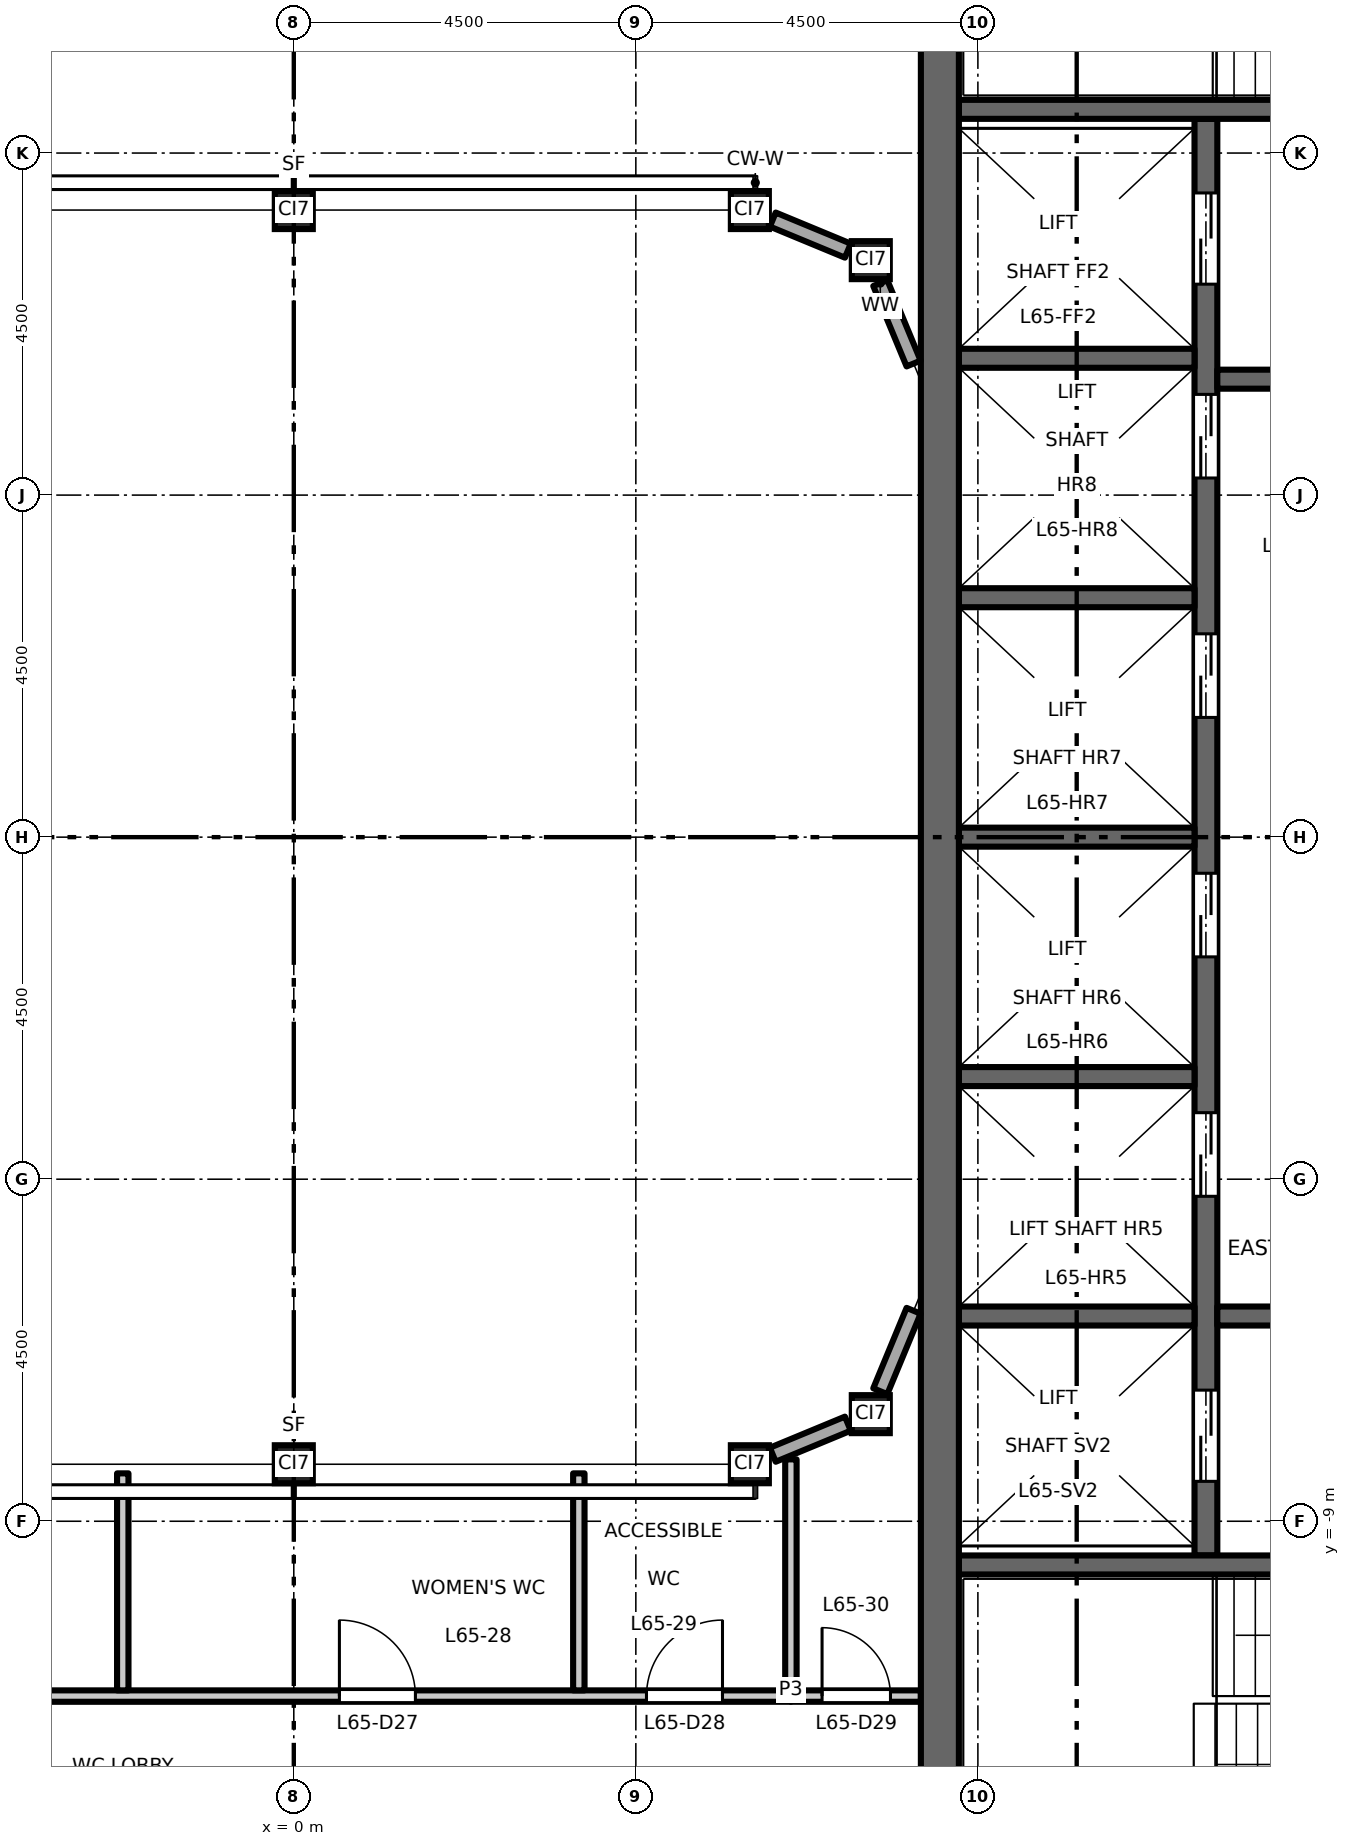
"""IFC4 building model, lengths in metres.
Left out: names, types, materials, properties, quantities, classifications, styles, units other than length and angle.
Written with IfcOpenShell. Run it as: python <this file> out.ifc"""

import sys

from ifc_helpers import new_model, si_unit, direction, frame, frame_2d, origin, origin_2d, place, context, subcontext, project, spatial, rectangle, hollow_rectangle, extrude, element, fill, save


model = new_model("IFC4")
c1 = context("Model", 3, precision=1e-05, world=origin(), true_north=direction((0.0, 1.0)))
c2 = subcontext(c1, "Body", "Model", "MODEL_VIEW")
j1 = project(units=[si_unit("LENGTHUNIT", "METRE"), si_unit("PLANEANGLEUNIT", "RADIAN")], contexts=[c1])
p1 = place(None, origin())
s1 = spatial("IfcSite", under=j1, at=p1, CompositionType="ELEMENT")
p2 = place(p1, origin())
s2 = spatial("IfcBuilding", under=s1, at=p2, CompositionType="ELEMENT")
p3 = place(p2, frame((0.0, 0.0, 303.2)))
s3 = spatial("IfcBuildingStorey", under=s2, at=p3, CompositionType="ELEMENT", Elevation=303.2)
for number, where, z_axis, x_axis in (
    (1, (0.0, -8.25, 0.0), (0.0, 0.0, 1.0), (1.0, 0.0, 0.0)),
    (2, (6.0, -8.25, 0.0), (0.0, 0.0, 1.0), (1.0, 0.0, 0.0)),
    (3, (7.591, -7.591, 0.0), (0.0, 0.0, 1.0), (1.0, 0.0, 0.0)),
    (4, (0.0, 8.25, 0.0), (0.0, 0.0, 1.0), (1.0, 0.0, 0.0)),
    (5, (6.0, 8.25, 0.0), (0.0, 0.0, 1.0), (1.0, 0.0, 0.0)),
    (6, (7.591, 7.591, 0.0), (0.0, 0.0, 1.0), (1.0, 0.0, 0.0)),
):
    element("IfcColumn", number, at=place(p3, frame(where, z_axis=z_axis, x_axis=x_axis)), inside=s3, PredefinedType="COLUMN", context=c2, shape_type="SweptSolid", body=[
        extrude(hollow_rectangle(XDim=0.5, YDim=0.5, WallThickness=0.025, at=origin_2d()), origin(), (0.0, 0.0, 1.0), 4.5),
    ])
p4 = place(p3, frame((12.0, -9.45, 0.0), z_axis=(0.0, 0.0, 1.0), x_axis=(0.0, 1.0, 0.0)))
e7 = element("IfcWall", 7, at=p4, inside=s3, PredefinedType="SHEAR", context=c2, shape_type="SweptSolid", body=[
    extrude(rectangle(XDim=18.9, YDim=0.3, at=frame_2d((9.45, 0.0))), origin(), (0.0, 0.0, 1.0), 4.35),
])
p5 = place(p4, frame((4.725, 0.0, 0.0)))
e8 = element("IfcOpeningElement", 8, at=p5, cuts=e7, PredefinedType="OPENING", context=c2, shape_type="SweptSolid", body=[
    extrude(rectangle(XDim=1.1, YDim=2.1, at=frame_2d((0.55, 1.05))), frame((0.0, 0.16, 0.0), z_axis=(0.0, -1.0, 0.0), x_axis=(1.0, 0.0, 0.0)), (0.0, 0.0, 1.0), 0.32),
])
p6 = place(p4, frame((7.875, 0.0, 0.0)))
e9 = element("IfcOpeningElement", 9, at=p6, cuts=e7, PredefinedType="OPENING", context=c2, shape_type="SweptSolid", body=[
    extrude(rectangle(XDim=1.1, YDim=2.1, at=frame_2d((0.55, 1.05))), frame((0.0, 0.16, 0.0), z_axis=(0.0, -1.0, 0.0), x_axis=(1.0, 0.0, 0.0)), (0.0, 0.0, 1.0), 0.32),
])
p7 = place(p4, frame((11.025, 0.0, 0.0)))
e10 = element("IfcOpeningElement", 10, at=p7, cuts=e7, PredefinedType="OPENING", context=c2, shape_type="SweptSolid", body=[
    extrude(rectangle(XDim=1.1, YDim=2.1, at=frame_2d((0.55, 1.05))), frame((0.0, 0.16, 0.0), z_axis=(0.0, -1.0, 0.0), x_axis=(1.0, 0.0, 0.0)), (0.0, 0.0, 1.0), 0.32),
])
p8 = place(p4, frame((14.175, 0.0, 0.0)))
e11 = element("IfcOpeningElement", 11, at=p8, cuts=e7, PredefinedType="OPENING", context=c2, shape_type="SweptSolid", body=[
    extrude(rectangle(XDim=1.1, YDim=2.1, at=frame_2d((0.55, 1.05))), frame((0.0, 0.16, 0.0), z_axis=(0.0, -1.0, 0.0), x_axis=(1.0, 0.0, 0.0)), (0.0, 0.0, 1.0), 0.32),
])
p9 = place(p4, frame((16.725, 0.0, 0.0)))
e12 = element("IfcOpeningElement", 12, at=p9, cuts=e7, PredefinedType="OPENING", context=c2, shape_type="SweptSolid", body=[
    extrude(rectangle(XDim=1.2, YDim=2.1, at=frame_2d((0.6, 1.05))), frame((0.0, 0.16, 0.0), z_axis=(0.0, -1.0, 0.0), x_axis=(1.0, 0.0, 0.0)), (0.0, 0.0, 1.0), 0.32),
])
p10 = place(p4, frame((0.975, 0.0, 0.0)))
e13 = element("IfcOpeningElement", 13, at=p10, cuts=e7, PredefinedType="OPENING", context=c2, shape_type="SweptSolid", body=[
    extrude(rectangle(XDim=1.2, YDim=2.1, at=frame_2d((0.6, 1.05))), frame((0.0, 0.16, 0.0), z_axis=(0.0, -1.0, 0.0), x_axis=(1.0, 0.0, 0.0)), (0.0, 0.0, 1.0), 0.32),
])
p11 = place(p3, frame((12.15, 6.025, 0.0), z_axis=(0.0, 0.0, 1.0), x_axis=(1.0, 0.0, 0.0)))
e14 = element("IfcWall", 14, at=p11, inside=s3, PredefinedType="SHEAR", context=c2, shape_type="SweptSolid", body=[
    extrude(rectangle(XDim=4.6, YDim=0.25, at=frame_2d((2.3, 0.0))), origin(), (0.0, 0.0, 1.0), 4.35),
])
p12 = place(p11, frame((1.8, 0.0, 0.0)))
e15 = element("IfcOpeningElement", 15, at=p12, cuts=e14, PredefinedType="OPENING", context=c2, shape_type="SweptSolid", body=[
    extrude(rectangle(XDim=1.0, YDim=2.1, at=frame_2d((0.5, 1.05))), frame((0.0, 0.135, 0.0), z_axis=(0.0, -1.0, 0.0), x_axis=(1.0, 0.0, 0.0)), (0.0, 0.0, 1.0), 0.27),
])
p13 = place(p3, frame((12.15, -6.3, 0.0), z_axis=(0.0, 0.0, 1.0), x_axis=(1.0, 0.0, 0.0)))
e16 = element("IfcWall", 16, at=p13, inside=s3, PredefinedType="SHEAR", context=c2, shape_type="SweptSolid", body=[
    extrude(rectangle(XDim=4.6, YDim=0.25, at=frame_2d((2.3, 0.0))), origin(), (0.0, 0.0, 1.0), 4.35),
])
p14 = place(p13, frame((1.8, 0.0, 0.0)))
e17 = element("IfcOpeningElement", 17, at=p14, cuts=e16, PredefinedType="OPENING", context=c2, shape_type="SweptSolid", body=[
    extrude(rectangle(XDim=1.0, YDim=2.1, at=frame_2d((0.5, 1.05))), frame((0.0, 0.135, 0.0), z_axis=(0.0, -1.0, 0.0), x_axis=(1.0, 0.0, 0.0)), (0.0, 0.0, 1.0), 0.27),
])
for number, where, z_axis, x_axis in (
    (18, (8.75, 0.0, 0.0), (0.0, 0.0, 1.0), (1.0, 0.0, 0.0)),
    (19, (8.75, 3.15, 0.0), (0.0, 0.0, 1.0), (1.0, 0.0, 0.0)),
    (20, (8.75, 6.3, 0.0), (0.0, 0.0, 1.0), (1.0, 0.0, 0.0)),
    (21, (8.75, -3.15, 0.0), (0.0, 0.0, 1.0), (1.0, 0.0, 0.0)),
    (22, (8.75, -6.3, 0.0), (0.0, 0.0, 1.0), (1.0, 0.0, 0.0)),
):
    element("IfcWall", number, at=place(p3, frame(where, z_axis=z_axis, x_axis=x_axis)), inside=s3, PredefinedType="SHEAR", context=c2, shape_type="SweptSolid", body=[
        extrude(rectangle(XDim=3.1, YDim=0.25, at=frame_2d((1.55, 0.0))), origin(), (0.0, 0.0, 1.0), 4.35),
    ])
p15 = place(p3, frame((8.75, 9.575, 0.0), z_axis=(0.0, 0.0, 1.0), x_axis=(1.0, 0.0, 0.0)))
e23 = element("IfcWall", 23, at=p15, inside=s3, PredefinedType="SHEAR", context=c2, shape_type="SweptSolid", body=[
    extrude(rectangle(XDim=8.0, YDim=0.25, at=frame_2d((4.0, 0.0))), origin(), (0.0, 0.0, 1.0), 4.35),
])
p16 = place(p15, frame((6.65, 0.0, 0.0)))
e24 = element("IfcOpeningElement", 24, at=p16, cuts=e23, PredefinedType="OPENING", context=c2, shape_type="SweptSolid", body=[
    extrude(rectangle(XDim=1.1, YDim=2.1, at=frame_2d((0.55, 1.05))), frame((0.0, 0.135, 0.0), z_axis=(0.0, -1.0, 0.0), x_axis=(1.0, 0.0, 0.0)), (0.0, 0.0, 1.0), 0.27),
])
p17 = place(p3, frame((8.75, -9.575, 0.0), z_axis=(0.0, 0.0, 1.0), x_axis=(1.0, 0.0, 0.0)))
e25 = element("IfcWall", 25, at=p17, inside=s3, PredefinedType="SHEAR", context=c2, shape_type="SweptSolid", body=[
    extrude(rectangle(XDim=8.0, YDim=0.25, at=frame_2d((4.0, 0.0))), origin(), (0.0, 0.0, 1.0), 4.35),
])
p18 = place(p17, frame((6.65, 0.0, 0.0)))
e26 = element("IfcOpeningElement", 26, at=p18, cuts=e25, PredefinedType="OPENING", context=c2, shape_type="SweptSolid", body=[
    extrude(rectangle(XDim=1.1, YDim=2.1, at=frame_2d((0.55, 1.05))), frame((0.0, 0.135, 0.0), z_axis=(0.0, -1.0, 0.0), x_axis=(1.0, 0.0, 0.0)), (0.0, 0.0, 1.0), 0.27),
])
p19 = place(p3, frame((8.5, -13.0, 0.0), z_axis=(0.0, 0.0, 1.0), x_axis=(0.0, 1.0, 0.0)))
e27 = element("IfcWall", 27, at=p19, inside=s3, PredefinedType="SHEAR", context=c2, shape_type="SweptSolid", body=[
    extrude(rectangle(XDim=26.0, YDim=0.5, at=frame_2d((13.0, 0.0))), origin(), (0.0, 0.0, 1.0), 4.35),
])
p20 = place(p3, frame((6.302, -8.125, 0.0), z_axis=(0.0, 0.0, 1.0), x_axis=(0.923919409248, 0.382587147216, 0.0)))
e28 = element("IfcWall", 28, at=p20, inside=s3, PredefinedType="STANDARD", context=c2, shape_type="SweptSolid", body=[
    extrude(rectangle(XDim=1.069, YDim=0.2, at=frame_2d((0.534, 0.0))), origin(), (0.0, 0.0, 1.0), 4.01),
])
for number, where, z_axis, x_axis in (
    (29, (7.716, -7.289, 0.0), (0.0, 0.0, 1.0), (0.383, 0.924, 0.0)),
    (30, (8.154, 6.231, 0.0), (0.0, 0.0, 1.0), (-0.383, 0.924, 0.0)),
):
    element("IfcWall", number, at=place(p3, frame(where, z_axis=z_axis, x_axis=x_axis)), inside=s3, PredefinedType="STANDARD", context=c2, shape_type="SweptSolid", body=[
        extrude(rectangle(XDim=1.146, YDim=0.2, at=frame_2d((0.573, 0.0))), origin(), (0.0, 0.0, 1.0), 4.01),
    ])
p21 = place(p3, frame((7.289, 7.716, 0.0), z_axis=(0.0, 0.0, 1.0), x_axis=(-0.923919409248, 0.382587147216, 0.0)))
e31 = element("IfcWall", 31, at=p21, inside=s3, PredefinedType="STANDARD", context=c2, shape_type="SweptSolid", body=[
    extrude(rectangle(XDim=1.069, YDim=0.2, at=frame_2d((0.534, 0.0))), origin(), (0.0, 0.0, 1.0), 4.01),
])
p22 = place(p3, frame((-8.25, -11.3, 0.0), z_axis=(0.0, 0.0, 1.0), x_axis=(1.0, 0.0, 0.0)))
e32 = element("IfcWall", 32, at=p22, inside=s3, PredefinedType="PARTITIONING", context=c2, shape_type="SweptSolid", body=[
    extrude(rectangle(XDim=14.79, YDim=0.15, at=frame_2d((7.395, 0.0))), origin(), (0.0, 0.0, 1.0), 4.35),
])
p23 = place(p22, frame((2.6, 0.0, 0.0)))
e33 = element("IfcOpeningElement", 33, at=p23, cuts=e32, PredefinedType="OPENING", context=c2, shape_type="SweptSolid", body=[
    extrude(rectangle(XDim=1.0, YDim=2.1, at=frame_2d((0.5, 1.05))), frame((0.0, 0.085, 0.0), z_axis=(0.0, -1.0, 0.0), x_axis=(1.0, 0.0, 0.0)), (0.0, 0.0, 1.0), 0.17),
])
p24 = place(p22, frame((8.85, 0.0, 0.0)))
e34 = element("IfcOpeningElement", 34, at=p24, cuts=e32, PredefinedType="OPENING", context=c2, shape_type="SweptSolid", body=[
    extrude(rectangle(XDim=1.0, YDim=2.1, at=frame_2d((0.5, 1.05))), frame((0.0, 0.085, 0.0), z_axis=(0.0, -1.0, 0.0), x_axis=(1.0, 0.0, 0.0)), (0.0, 0.0, 1.0), 0.17),
])
p25 = place(p22, frame((12.89, 0.0, 0.0)))
e35 = element("IfcOpeningElement", 35, at=p25, cuts=e32, PredefinedType="OPENING", context=c2, shape_type="SweptSolid", body=[
    extrude(rectangle(XDim=1.0, YDim=2.1, at=frame_2d((0.5, 1.05))), frame((0.0, 0.085, 0.0), z_axis=(0.0, -1.0, 0.0), x_axis=(1.0, 0.0, 0.0)), (0.0, 0.0, 1.0), 0.17),
])
p26 = place(p3, frame((6.54, -11.3, 0.0), z_axis=(0.0, 0.0, 1.0), x_axis=(1.0, 0.0, 0.0)))
e36 = element("IfcWall", 36, at=p26, inside=s3, PredefinedType="PARTITIONING", context=c2, shape_type="SweptSolid", body=[
    extrude(rectangle(XDim=1.71, YDim=0.15, at=frame_2d((0.855, 0.0))), origin(), (0.0, 0.0, 1.0), 4.35),
])
p27 = place(p26, frame((0.41, 0.0, 0.0)))
e37 = element("IfcOpeningElement", 37, at=p27, cuts=e36, PredefinedType="OPENING", context=c2, shape_type="SweptSolid", body=[
    extrude(rectangle(XDim=0.9, YDim=2.1, at=frame_2d((0.45, 1.05))), frame((0.0, 0.085, 0.0), z_axis=(0.0, -1.0, 0.0), x_axis=(1.0, 0.0, 0.0)), (0.0, 0.0, 1.0), 0.17),
])
for number, where, z_axis, x_axis in (
    (38, (-2.25, -11.225, 0.0), (0.0, 0.0, 1.0), (0.0, 1.0, 0.0)),
    (39, (3.75, -11.225, 0.0), (0.0, 0.0, 1.0), (0.0, 1.0, 0.0)),
):
    element("IfcWall", number, at=place(p3, frame(where, z_axis=z_axis, x_axis=x_axis)), inside=s3, PredefinedType="PARTITIONING", context=c2, shape_type="SweptSolid", body=[
        extrude(rectangle(XDim=2.855, YDim=0.15, at=frame_2d((1.427, 0.0))), origin(), (0.0, 0.0, 1.0), 4.35),
    ])
p28 = place(p3, frame((6.54, -11.225, 0.0), z_axis=(0.0, 0.0, 1.0), x_axis=(0.0, 1.0, 0.0)))
e40 = element("IfcWall", 40, at=p28, inside=s3, PredefinedType="PARTITIONING", context=c2, shape_type="SweptSolid", body=[
    extrude(rectangle(XDim=3.039, YDim=0.15, at=frame_2d((1.52, 0.0))), origin(), (0.0, 0.0, 1.0), 4.35),
])
p29 = place(p5, origin())
e41 = element("IfcDoor", 41, at=p29, inside=s3, OperationType="DOUBLE_DOOR_SLIDING", PredefinedType="DOOR", context=c2, shape_type="SweptSolid", body=[
    extrude(rectangle(XDim=1.1, YDim=2.1, at=frame_2d((0.55, 1.05))), frame((0.0, 0.025, 0.0), z_axis=(0.0, -1.0, 0.0), x_axis=(1.0, 0.0, 0.0)), (0.0, 0.0, 1.0), 0.05),
])
fill(e8, e41)
p30 = place(p6, origin())
e42 = element("IfcDoor", 42, at=p30, inside=s3, OperationType="DOUBLE_DOOR_SLIDING", PredefinedType="DOOR", context=c2, shape_type="SweptSolid", body=[
    extrude(rectangle(XDim=1.1, YDim=2.1, at=frame_2d((0.55, 1.05))), frame((0.0, 0.025, 0.0), z_axis=(0.0, -1.0, 0.0), x_axis=(1.0, 0.0, 0.0)), (0.0, 0.0, 1.0), 0.05),
])
fill(e9, e42)
p31 = place(p7, origin())
e43 = element("IfcDoor", 43, at=p31, inside=s3, OperationType="DOUBLE_DOOR_SLIDING", PredefinedType="DOOR", context=c2, shape_type="SweptSolid", body=[
    extrude(rectangle(XDim=1.1, YDim=2.1, at=frame_2d((0.55, 1.05))), frame((0.0, 0.025, 0.0), z_axis=(0.0, -1.0, 0.0), x_axis=(1.0, 0.0, 0.0)), (0.0, 0.0, 1.0), 0.05),
])
fill(e10, e43)
p32 = place(p8, origin())
e44 = element("IfcDoor", 44, at=p32, inside=s3, OperationType="DOUBLE_DOOR_SLIDING", PredefinedType="DOOR", context=c2, shape_type="SweptSolid", body=[
    extrude(rectangle(XDim=1.1, YDim=2.1, at=frame_2d((0.55, 1.05))), frame((0.0, 0.025, 0.0), z_axis=(0.0, -1.0, 0.0), x_axis=(1.0, 0.0, 0.0)), (0.0, 0.0, 1.0), 0.05),
])
fill(e11, e44)
p33 = place(p9, origin())
e45 = element("IfcDoor", 45, at=p33, inside=s3, OperationType="DOUBLE_DOOR_SLIDING", PredefinedType="DOOR", context=c2, shape_type="SweptSolid", body=[
    extrude(rectangle(XDim=1.2, YDim=2.1, at=frame_2d((0.6, 1.05))), frame((0.0, 0.025, 0.0), z_axis=(0.0, -1.0, 0.0), x_axis=(1.0, 0.0, 0.0)), (0.0, 0.0, 1.0), 0.05),
])
fill(e12, e45)
p34 = place(p10, origin())
e46 = element("IfcDoor", 46, at=p34, inside=s3, OperationType="DOUBLE_DOOR_SLIDING", PredefinedType="DOOR", context=c2, shape_type="SweptSolid", body=[
    extrude(rectangle(XDim=1.2, YDim=2.1, at=frame_2d((0.6, 1.05))), frame((0.0, 0.025, 0.0), z_axis=(0.0, -1.0, 0.0), x_axis=(1.0, 0.0, 0.0)), (0.0, 0.0, 1.0), 0.05),
])
fill(e13, e46)
p35 = place(p24, origin())
e47 = element("IfcDoor", 47, at=p35, inside=s3, OperationType="SINGLE_SWING_LEFT", PredefinedType="DOOR", context=c2, shape_type="SweptSolid", body=[
    extrude(rectangle(XDim=1.0, YDim=2.1, at=frame_2d((0.5, 1.05))), frame((0.0, 0.025, 0.0), z_axis=(0.0, -1.0, 0.0), x_axis=(1.0, 0.0, 0.0)), (0.0, 0.0, 1.0), 0.05),
])
fill(e34, e47)
p36 = place(p25, origin())
e48 = element("IfcDoor", 48, at=p36, inside=s3, OperationType="SINGLE_SWING_RIGHT", PredefinedType="DOOR", context=c2, shape_type="SweptSolid", body=[
    extrude(rectangle(XDim=1.0, YDim=2.1, at=frame_2d((0.5, 1.05))), frame((0.0, 0.025, 0.0), z_axis=(0.0, -1.0, 0.0), x_axis=(1.0, 0.0, 0.0)), (0.0, 0.0, 1.0), 0.05),
])
fill(e35, e48)
p37 = place(p27, origin())
e49 = element("IfcDoor", 49, at=p37, inside=s3, OperationType="SINGLE_SWING_LEFT", PredefinedType="DOOR", context=c2, shape_type="SweptSolid", body=[
    extrude(rectangle(XDim=0.9, YDim=2.1, at=frame_2d((0.45, 1.05))), frame((0.0, 0.025, 0.0), z_axis=(0.0, -1.0, 0.0), x_axis=(1.0, 0.0, 0.0)), (0.0, 0.0, 1.0), 0.05),
])
fill(e37, e49)
save(model, sys.argv[1])
